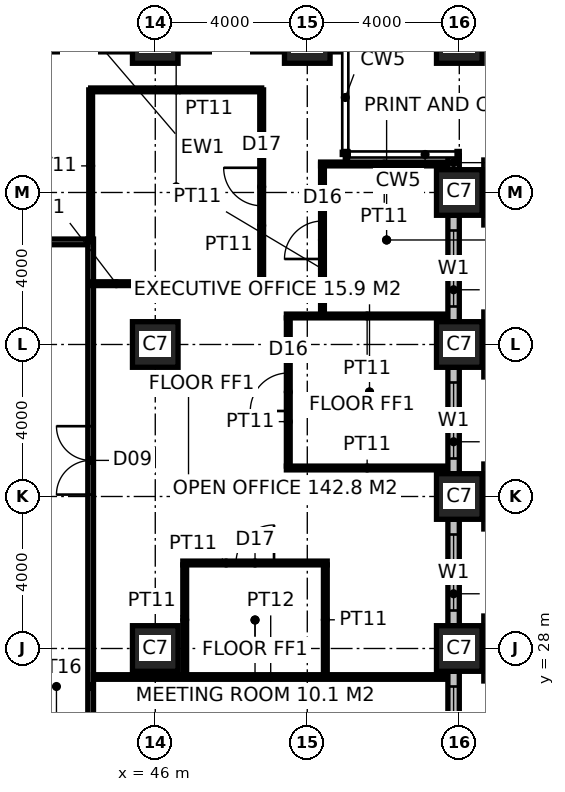
"""IFC4 building model, lengths in metres.
Left out: names, types, materials, properties, quantities, classifications, styles, units other than length and angle.
Written with IfcOpenShell. Run it as: python <this file> out.ifc"""

import sys

from ifc_helpers import new_model, si_unit, direction, frame, frame_2d, origin, origin_2d, place, context, subcontext, project, spatial, rectangle, hollow_rectangle, extrude, element, fill, save


model = new_model("IFC4")
c1 = context("Model", 3, precision=1e-05, world=origin(), true_north=direction((0.0, 1.0)))
c2 = subcontext(c1, "Body", "Model", "MODEL_VIEW")
j1 = project(units=[si_unit("LENGTHUNIT", "METRE"), si_unit("PLANEANGLEUNIT", "RADIAN")], contexts=[c1])
p1 = place(None, origin())
s1 = spatial("IfcSite", under=j1, at=p1, CompositionType="ELEMENT")
p2 = place(p1, origin())
s2 = spatial("IfcBuilding", under=s1, at=p2, CompositionType="ELEMENT")
p3 = place(p2, frame((0.0, 0.0, 19.0)))
s3 = spatial("IfcBuildingStorey", under=s2, at=p3, CompositionType="ELEMENT", Elevation=19.0)
for number, where, z_axis, x_axis in (
    (1, (46.0, 44.0, 0.0), (0.0, 0.0, 1.0), (1.0, 0.0, 0.0)),
    (2, (50.0, 44.0, 0.0), (0.0, 0.0, 1.0), (1.0, 0.0, 0.0)),
    (3, (54.0, 28.0, 0.0), (0.0, 0.0, 1.0), (1.0, 0.0, 0.0)),
    (4, (54.0, 32.0, 0.0), (0.0, 0.0, 1.0), (1.0, 0.0, 0.0)),
    (5, (54.0, 36.0, 0.0), (0.0, 0.0, 1.0), (1.0, 0.0, 0.0)),
    (6, (54.0, 40.0, 0.0), (0.0, 0.0, 1.0), (1.0, 0.0, 0.0)),
    (7, (54.0, 44.0, 0.0), (0.0, 0.0, 1.0), (1.0, 0.0, 0.0)),
    (8, (46.0, 28.0, 0.0), (0.0, 0.0, 1.0), (1.0, 0.0, 0.0)),
    (9, (46.0, 36.0, 0.0), (0.0, 0.0, 1.0), (1.0, 0.0, 0.0)),
):
    element("IfcColumn", number, at=place(p3, frame(where, z_axis=z_axis, x_axis=x_axis)), inside=s3, PredefinedType="COLUMN", context=c2, shape_type="SweptSolid", body=[
        extrude(hollow_rectangle(XDim=1.2, YDim=1.2, WallThickness=0.1, at=origin_2d()), origin(), (0.0, 0.0, 1.0), 4.0),
    ])
p4 = place(p3, frame((44.3, 15.225, 0.0), z_axis=(0.0, 0.0, 1.0), x_axis=(0.0, 1.0, 0.0)))
e10 = element("IfcWall", 10, at=p4, inside=s3, PredefinedType="PARTITIONING", context=c2, shape_type="SweptSolid", body=[
    extrude(rectangle(XDim=23.55, YDim=0.15, at=frame_2d((11.775, 0.0))), origin(), (0.0, 0.0, 1.0), 3.85),
])
p5 = place(p4, frame((5.575, 0.0, 0.0)))
e11 = element("IfcOpeningElement", 11, at=p5, cuts=e10, PredefinedType="OPENING", context=c2, shape_type="SweptSolid", body=[
    extrude(rectangle(XDim=1.8, YDim=2.4, at=frame_2d((0.9, 1.2))), frame((0.0, 0.085, 0.0), z_axis=(0.0, -1.0, 0.0), x_axis=(1.0, 0.0, 0.0)), (0.0, 0.0, 1.0), 0.17),
])
p6 = place(p4, frame((16.825, 0.0, 0.0)))
e12 = element("IfcOpeningElement", 12, at=p6, cuts=e10, PredefinedType="OPENING", context=c2, shape_type="SweptSolid", body=[
    extrude(rectangle(XDim=1.8, YDim=2.4, at=frame_2d((0.9, 1.2))), frame((0.0, 0.085, 0.0), z_axis=(0.0, -1.0, 0.0), x_axis=(1.0, 0.0, 0.0)), (0.0, 0.0, 1.0), 0.17),
])
p7 = place(p3, frame((15.775, 38.7, 0.0), z_axis=(0.0, 0.0, 1.0), x_axis=(1.0, 0.0, 0.0)))
e13 = element("IfcWall", 13, at=p7, inside=s3, PredefinedType="PARTITIONING", context=c2, shape_type="SweptSolid", body=[
    extrude(rectangle(XDim=28.45, YDim=0.15, at=frame_2d((14.225, 0.0))), origin(), (0.0, 0.0, 1.0), 3.85),
])
p8 = place(p7, frame((7.975, 0.0, 0.0)))
e14 = element("IfcOpeningElement", 14, at=p8, cuts=e13, PredefinedType="OPENING", context=c2, shape_type="SweptSolid", body=[
    extrude(rectangle(XDim=0.9, YDim=2.1, at=frame_2d((0.45, 1.05))), frame((0.0, 0.085, 0.0), z_axis=(0.0, -1.0, 0.0), x_axis=(1.0, 0.0, 0.0)), (0.0, 0.0, 1.0), 0.17),
])
p9 = place(p7, frame((11.725, 0.0, 0.0)))
e15 = element("IfcOpeningElement", 15, at=p9, cuts=e13, PredefinedType="OPENING", context=c2, shape_type="SweptSolid", body=[
    extrude(rectangle(XDim=1.0, YDim=2.1, at=frame_2d((0.5, 1.05))), frame((0.0, 0.085, 0.0), z_axis=(0.0, -1.0, 0.0), x_axis=(1.0, 0.0, 0.0)), (0.0, 0.0, 1.0), 0.17),
])
p10 = place(p7, frame((15.575, 0.0, 0.0)))
e16 = element("IfcOpeningElement", 16, at=p10, cuts=e13, PredefinedType="OPENING", context=c2, shape_type="SweptSolid", body=[
    extrude(rectangle(XDim=0.9, YDim=2.1, at=frame_2d((0.45, 1.05))), frame((0.0, 0.085, 0.0), z_axis=(0.0, -1.0, 0.0), x_axis=(1.0, 0.0, 0.0)), (0.0, 0.0, 1.0), 0.17),
])
p11 = place(p3, frame((44.375, 27.25, 0.0), z_axis=(0.0, 0.0, 1.0), x_axis=(1.0, 0.0, 0.0)))
e17 = element("IfcWall", 17, at=p11, inside=s3, PredefinedType="PARTITIONING", context=c2, shape_type="SweptSolid", body=[
    extrude(rectangle(XDim=9.325, YDim=0.12, at=frame_2d((4.663, 0.0))), origin(), (0.0, 0.0, 1.0), 3.85),
])
p12 = place(p3, frame((46.725, 30.25, 0.0), z_axis=(0.0, 0.0, 1.0), x_axis=(1.0, 0.0, 0.0)))
e18 = element("IfcWall", 18, at=p12, inside=s3, PredefinedType="PARTITIONING", context=c2, shape_type="SweptSolid", body=[
    extrude(rectangle(XDim=3.8, YDim=0.1, at=frame_2d((1.9, 0.0))), origin(), (0.0, 0.0, 1.0), 3.85),
])
p13 = place(p12, frame((1.4, 0.0, 0.0)))
e19 = element("IfcOpeningElement", 19, at=p13, cuts=e18, PredefinedType="OPENING", context=c2, shape_type="SweptSolid", body=[
    extrude(rectangle(XDim=1.0, YDim=2.2, at=frame_2d((0.5, 1.1))), frame((0.0, 0.06, 0.0), z_axis=(0.0, -1.0, 0.0), x_axis=(1.0, 0.0, 0.0)), (0.0, 0.0, 1.0), 0.12),
])
for number, where, z_axis, x_axis in (
    (20, (49.45, 32.75, 0.0), (0.0, 0.0, 1.0), (1.0, 0.0, 0.0)),
    (21, (49.45, 36.75, 0.0), (0.0, 0.0, 1.0), (1.0, 0.0, 0.0)),
):
    element("IfcWall", number, at=place(p3, frame(where, z_axis=z_axis, x_axis=x_axis)), inside=s3, PredefinedType="PARTITIONING", context=c2, shape_type="SweptSolid", body=[
        extrude(rectangle(XDim=4.25, YDim=0.1, at=frame_2d((2.125, 0.0))), origin(), (0.0, 0.0, 1.0), 3.85),
    ])
p14 = place(p3, frame((50.35, 40.75, 0.0), z_axis=(0.0, 0.0, 1.0), x_axis=(1.0, 0.0, 0.0)))
e22 = element("IfcWall", 22, at=p14, inside=s3, PredefinedType="PARTITIONING", context=c2, shape_type="SweptSolid", body=[
    extrude(rectangle(XDim=3.35, YDim=0.1, at=frame_2d((1.675, 0.0))), origin(), (0.0, 0.0, 1.0), 3.85),
])
p15 = place(p3, frame((46.775, 27.31, 0.0), z_axis=(0.0, 0.0, 1.0), x_axis=(0.0, 1.0, 0.0)))
e23 = element("IfcWall", 23, at=p15, inside=s3, PredefinedType="PARTITIONING", context=c2, shape_type="SweptSolid", body=[
    extrude(rectangle(XDim=2.89, YDim=0.1, at=frame_2d((1.445, 0.0))), origin(), (0.0, 0.0, 1.0), 3.85),
])
p16 = place(p3, frame((49.5, 32.8, 0.0), z_axis=(0.0, 0.0, 1.0), x_axis=(0.0, 1.0, 0.0)))
e24 = element("IfcWall", 24, at=p16, inside=s3, PredefinedType="PARTITIONING", context=c2, shape_type="SweptSolid", body=[
    extrude(rectangle(XDim=3.9, YDim=0.1, at=frame_2d((1.95, 0.0))), origin(), (0.0, 0.0, 1.0), 3.85),
])
p17 = place(p16, frame((1.45, 0.0, 0.0)))
e25 = element("IfcOpeningElement", 25, at=p17, cuts=e24, PredefinedType="OPENING", context=c2, shape_type="SweptSolid", body=[
    extrude(rectangle(XDim=1.0, YDim=2.2, at=frame_2d((0.5, 1.1))), frame((0.0, 0.06, 0.0), z_axis=(0.0, -1.0, 0.0), x_axis=(1.0, 0.0, 0.0)), (0.0, 0.0, 1.0), 0.12),
])
p18 = place(p3, frame((50.4, 36.8, 0.0), z_axis=(0.0, 0.0, 1.0), x_axis=(0.0, 1.0, 0.0)))
e26 = element("IfcWall", 26, at=p18, inside=s3, PredefinedType="PARTITIONING", context=c2, shape_type="SweptSolid", body=[
    extrude(rectangle(XDim=3.95, YDim=0.1, at=frame_2d((1.975, 0.0))), origin(), (0.0, 0.0, 1.0), 2.95),
])
p19 = place(p18, frame((1.45, 0.0, 0.0)))
e27 = element("IfcOpeningElement", 27, at=p19, cuts=e26, PredefinedType="OPENING", context=c2, shape_type="SweptSolid", body=[
    extrude(rectangle(XDim=1.0, YDim=2.2, at=frame_2d((0.5, 1.1))), frame((0.0, 0.06, 0.0), z_axis=(0.0, -1.0, 0.0), x_axis=(1.0, 0.0, 0.0)), (0.0, 0.0, 1.0), 0.12),
])
p20 = place(p3, frame((50.475, 27.31, 0.0), z_axis=(0.0, 0.0, 1.0), x_axis=(0.0, 1.0, 0.0)))
e28 = element("IfcWall", 28, at=p20, inside=s3, PredefinedType="PARTITIONING", context=c2, shape_type="SweptSolid", body=[
    extrude(rectangle(XDim=2.89, YDim=0.1, at=frame_2d((1.445, 0.0))), origin(), (0.0, 0.0, 1.0), 3.85),
])
p21 = place(p3, frame((44.3, 37.6, 0.0), z_axis=(0.0, 0.0, 1.0), x_axis=(1.0, 0.0, 0.0)))
e29 = element("IfcWall", 29, at=p21, inside=s3, PredefinedType="PARTITIONING", context=c2, shape_type="SweptSolid", body=[
    extrude(rectangle(XDim=4.5, YDim=0.1, at=frame_2d((2.25, 0.0))), origin(), (0.0, 0.0, 1.0), 3.85),
])
p22 = place(p3, frame((48.8, 37.6, 0.0), z_axis=(0.0, 0.0, 1.0), x_axis=(0.0, 1.0, 0.0)))
e30 = element("IfcWall", 30, at=p22, inside=s3, PredefinedType="PARTITIONING", context=c2, shape_type="SweptSolid", body=[
    extrude(rectangle(XDim=5.1, YDim=0.1, at=frame_2d((2.55, 0.0))), origin(), (0.0, 0.0, 1.0), 3.85),
])
p23 = place(p22, frame((2.05, 0.0, 0.0)))
e31 = element("IfcOpeningElement", 31, at=p23, cuts=e30, PredefinedType="OPENING", context=c2, shape_type="SweptSolid", body=[
    extrude(rectangle(XDim=1.0, YDim=2.2, at=frame_2d((0.5, 1.1))), frame((0.0, 0.06, 0.0), z_axis=(0.0, -1.0, 0.0), x_axis=(1.0, 0.0, 0.0)), (0.0, 0.0, 1.0), 0.12),
])
p24 = place(p3, frame((48.8, 42.7, 0.0), z_axis=(0.0, 0.0, 1.0), x_axis=(-1.0, 0.0, 0.0)))
e32 = element("IfcWall", 32, at=p24, inside=s3, PredefinedType="PARTITIONING", context=c2, shape_type="SweptSolid", body=[
    extrude(rectangle(XDim=4.5, YDim=0.1, at=frame_2d((2.25, 0.0))), origin(), (0.0, 0.0, 1.0), 3.85),
])
p25 = place(p3, frame((44.3, 42.7, 0.0), z_axis=(0.0, 0.0, 1.0), x_axis=(0.0, -1.0, 0.0)))
e33 = element("IfcWall", 33, at=p25, inside=s3, PredefinedType="PARTITIONING", context=c2, shape_type="SweptSolid", body=[
    extrude(rectangle(XDim=4.0, YDim=0.1, at=frame_2d((2.0, 0.0))), origin(), (0.0, 0.0, 1.0), 3.85),
])
p26 = place(p3, frame((53.85, 24.6, 0.0), z_axis=(0.0, 0.0, 1.0), x_axis=(0.0, 1.0, 0.0)))
e34 = element("IfcWall", 34, at=p26, inside=s3, PredefinedType="ELEMENTEDWALL", context=c2, shape_type="SweptSolid", body=[
    extrude(rectangle(XDim=2.8, YDim=0.3, at=frame_2d((1.4, 0.0))), origin(), (0.0, 0.0, 1.0), 2.85),
])
p27 = place(p26, frame((0.4, 0.0, 0.8)))
e35 = element("IfcOpeningElement", 35, at=p27, cuts=e34, PredefinedType="OPENING", context=c2, shape_type="SweptSolid", body=[
    extrude(rectangle(XDim=2.0, YDim=2.0, at=frame_2d((1.0, 1.0))), frame((0.0, 0.16, 0.0), z_axis=(0.0, -1.0, 0.0), x_axis=(1.0, 0.0, 0.0)), (0.0, 0.0, 1.0), 0.32),
])
p28 = place(p3, frame((53.85, 28.6, 0.0), z_axis=(0.0, 0.0, 1.0), x_axis=(0.0, 1.0, 0.0)))
e36 = element("IfcWall", 36, at=p28, inside=s3, PredefinedType="ELEMENTEDWALL", context=c2, shape_type="SweptSolid", body=[
    extrude(rectangle(XDim=2.8, YDim=0.3, at=frame_2d((1.4, 0.0))), origin(), (0.0, 0.0, 1.0), 2.85),
])
p29 = place(p28, frame((0.4, 0.0, 0.8)))
e37 = element("IfcOpeningElement", 37, at=p29, cuts=e36, PredefinedType="OPENING", context=c2, shape_type="SweptSolid", body=[
    extrude(rectangle(XDim=2.0, YDim=2.0, at=frame_2d((1.0, 1.0))), frame((0.0, 0.16, 0.0), z_axis=(0.0, -1.0, 0.0), x_axis=(1.0, 0.0, 0.0)), (0.0, 0.0, 1.0), 0.32),
])
p30 = place(p3, frame((53.85, 32.6, 0.0), z_axis=(0.0, 0.0, 1.0), x_axis=(0.0, 1.0, 0.0)))
e38 = element("IfcWall", 38, at=p30, inside=s3, PredefinedType="ELEMENTEDWALL", context=c2, shape_type="SweptSolid", body=[
    extrude(rectangle(XDim=2.8, YDim=0.3, at=frame_2d((1.4, 0.0))), origin(), (0.0, 0.0, 1.0), 2.85),
])
p31 = place(p30, frame((0.4, 0.0, 0.8)))
e39 = element("IfcOpeningElement", 39, at=p31, cuts=e38, PredefinedType="OPENING", context=c2, shape_type="SweptSolid", body=[
    extrude(rectangle(XDim=2.0, YDim=2.0, at=frame_2d((1.0, 1.0))), frame((0.0, 0.16, 0.0), z_axis=(0.0, -1.0, 0.0), x_axis=(1.0, 0.0, 0.0)), (0.0, 0.0, 1.0), 0.32),
])
p32 = place(p3, frame((53.85, 36.6, 0.0), z_axis=(0.0, 0.0, 1.0), x_axis=(0.0, 1.0, 0.0)))
e40 = element("IfcWall", 40, at=p32, inside=s3, PredefinedType="ELEMENTEDWALL", context=c2, shape_type="SweptSolid", body=[
    extrude(rectangle(XDim=2.8, YDim=0.3, at=frame_2d((1.4, 0.0))), origin(), (0.0, 0.0, 1.0), 2.85),
])
p33 = place(p32, frame((0.4, 0.0, 0.8)))
e41 = element("IfcOpeningElement", 41, at=p33, cuts=e40, PredefinedType="OPENING", context=c2, shape_type="SweptSolid", body=[
    extrude(rectangle(XDim=2.0, YDim=2.0, at=frame_2d((1.0, 1.0))), frame((0.0, 0.16, 0.0), z_axis=(0.0, -1.0, 0.0), x_axis=(1.0, 0.0, 0.0)), (0.0, 0.0, 1.0), 0.32),
])
p34 = place(p3, frame((53.85, 40.6, 0.0), z_axis=(0.0, 0.0, 1.0), x_axis=(0.0, 1.0, 0.0)))
e42 = element("IfcWall", 42, at=p34, inside=s3, PredefinedType="ELEMENTEDWALL", context=c2, shape_type="SweptSolid", body=[
    extrude(rectangle(XDim=0.37, YDim=0.3, at=frame_2d((0.185, 0.0))), origin(), (0.0, 0.0, 1.0), 2.95),
])
p35 = place(p6, origin())
e43 = element("IfcDoor", 43, at=p35, inside=s3, OperationType="DOUBLE_DOOR_DOUBLE_SWING", PredefinedType="DOOR", context=c2, shape_type="SweptSolid", body=[
    extrude(rectangle(XDim=1.8, YDim=2.4, at=frame_2d((0.9, 1.2))), frame((0.0, 0.025, 0.0), z_axis=(0.0, -1.0, 0.0), x_axis=(1.0, 0.0, 0.0)), (0.0, 0.0, 1.0), 0.05),
])
fill(e12, e43)
p36 = place(p17, origin())
e44 = element("IfcDoor", 44, at=p36, inside=s3, OperationType="SINGLE_SWING_LEFT", PredefinedType="DOOR", context=c2, shape_type="SweptSolid", body=[
    extrude(rectangle(XDim=1.0, YDim=2.2, at=frame_2d((0.5, 1.1))), frame((0.0, 0.025, 0.0), z_axis=(0.0, -1.0, 0.0), x_axis=(1.0, 0.0, 0.0)), (0.0, 0.0, 1.0), 0.05),
])
fill(e25, e44)
p37 = place(p19, origin())
e45 = element("IfcDoor", 45, at=p37, inside=s3, OperationType="SINGLE_SWING_LEFT", PredefinedType="DOOR", context=c2, shape_type="SweptSolid", body=[
    extrude(rectangle(XDim=1.0, YDim=2.2, at=frame_2d((0.5, 1.1))), frame((0.0, 0.025, 0.0), z_axis=(0.0, -1.0, 0.0), x_axis=(1.0, 0.0, 0.0)), (0.0, 0.0, 1.0), 0.05),
])
fill(e27, e45)
p38 = place(p13, origin())
e46 = element("IfcDoor", 46, at=p38, inside=s3, OperationType="SINGLE_SWING_RIGHT", PredefinedType="DOOR", context=c2, shape_type="SweptSolid", body=[
    extrude(rectangle(XDim=1.0, YDim=2.2, at=frame_2d((0.5, 1.1))), frame((0.0, 0.025, 0.0), z_axis=(0.0, -1.0, 0.0), x_axis=(1.0, 0.0, 0.0)), (0.0, 0.0, 1.0), 0.05),
])
fill(e19, e46)
p39 = place(p23, origin())
e47 = element("IfcDoor", 47, at=p39, inside=s3, OperationType="SINGLE_SWING_RIGHT", PredefinedType="DOOR", context=c2, shape_type="SweptSolid", body=[
    extrude(rectangle(XDim=1.0, YDim=2.2, at=frame_2d((0.5, 1.1))), frame((0.0, 0.025, 0.0), z_axis=(0.0, -1.0, 0.0), x_axis=(1.0, 0.0, 0.0)), (0.0, 0.0, 1.0), 0.05),
])
fill(e31, e47)
p40 = place(p27, origin())
e48 = element("IfcWindow", 48, at=p40, inside=s3, PartitioningType="SINGLE_PANEL", PredefinedType="WINDOW", context=c2, shape_type="SweptSolid", body=[
    extrude(rectangle(XDim=2.0, YDim=2.0, at=frame_2d((1.0, 1.0))), frame((0.0, 0.03, 0.0), z_axis=(0.0, -1.0, 0.0), x_axis=(1.0, 0.0, 0.0)), (0.0, 0.0, 1.0), 0.06),
])
fill(e35, e48)
p41 = place(p29, origin())
e49 = element("IfcWindow", 49, at=p41, inside=s3, PartitioningType="SINGLE_PANEL", PredefinedType="WINDOW", context=c2, shape_type="SweptSolid", body=[
    extrude(rectangle(XDim=2.0, YDim=2.0, at=frame_2d((1.0, 1.0))), frame((0.0, 0.03, 0.0), z_axis=(0.0, -1.0, 0.0), x_axis=(1.0, 0.0, 0.0)), (0.0, 0.0, 1.0), 0.06),
])
fill(e37, e49)
p42 = place(p31, origin())
e50 = element("IfcWindow", 50, at=p42, inside=s3, PartitioningType="SINGLE_PANEL", PredefinedType="WINDOW", context=c2, shape_type="SweptSolid", body=[
    extrude(rectangle(XDim=2.0, YDim=2.0, at=frame_2d((1.0, 1.0))), frame((0.0, 0.03, 0.0), z_axis=(0.0, -1.0, 0.0), x_axis=(1.0, 0.0, 0.0)), (0.0, 0.0, 1.0), 0.06),
])
fill(e39, e50)
p43 = place(p33, origin())
e51 = element("IfcWindow", 51, at=p43, inside=s3, PartitioningType="SINGLE_PANEL", PredefinedType="WINDOW", context=c2, shape_type="SweptSolid", body=[
    extrude(rectangle(XDim=2.0, YDim=2.0, at=frame_2d((1.0, 1.0))), frame((0.0, 0.03, 0.0), z_axis=(0.0, -1.0, 0.0), x_axis=(1.0, 0.0, 0.0)), (0.0, 0.0, 1.0), 0.06),
])
fill(e41, e51)
save(model, sys.argv[1])
